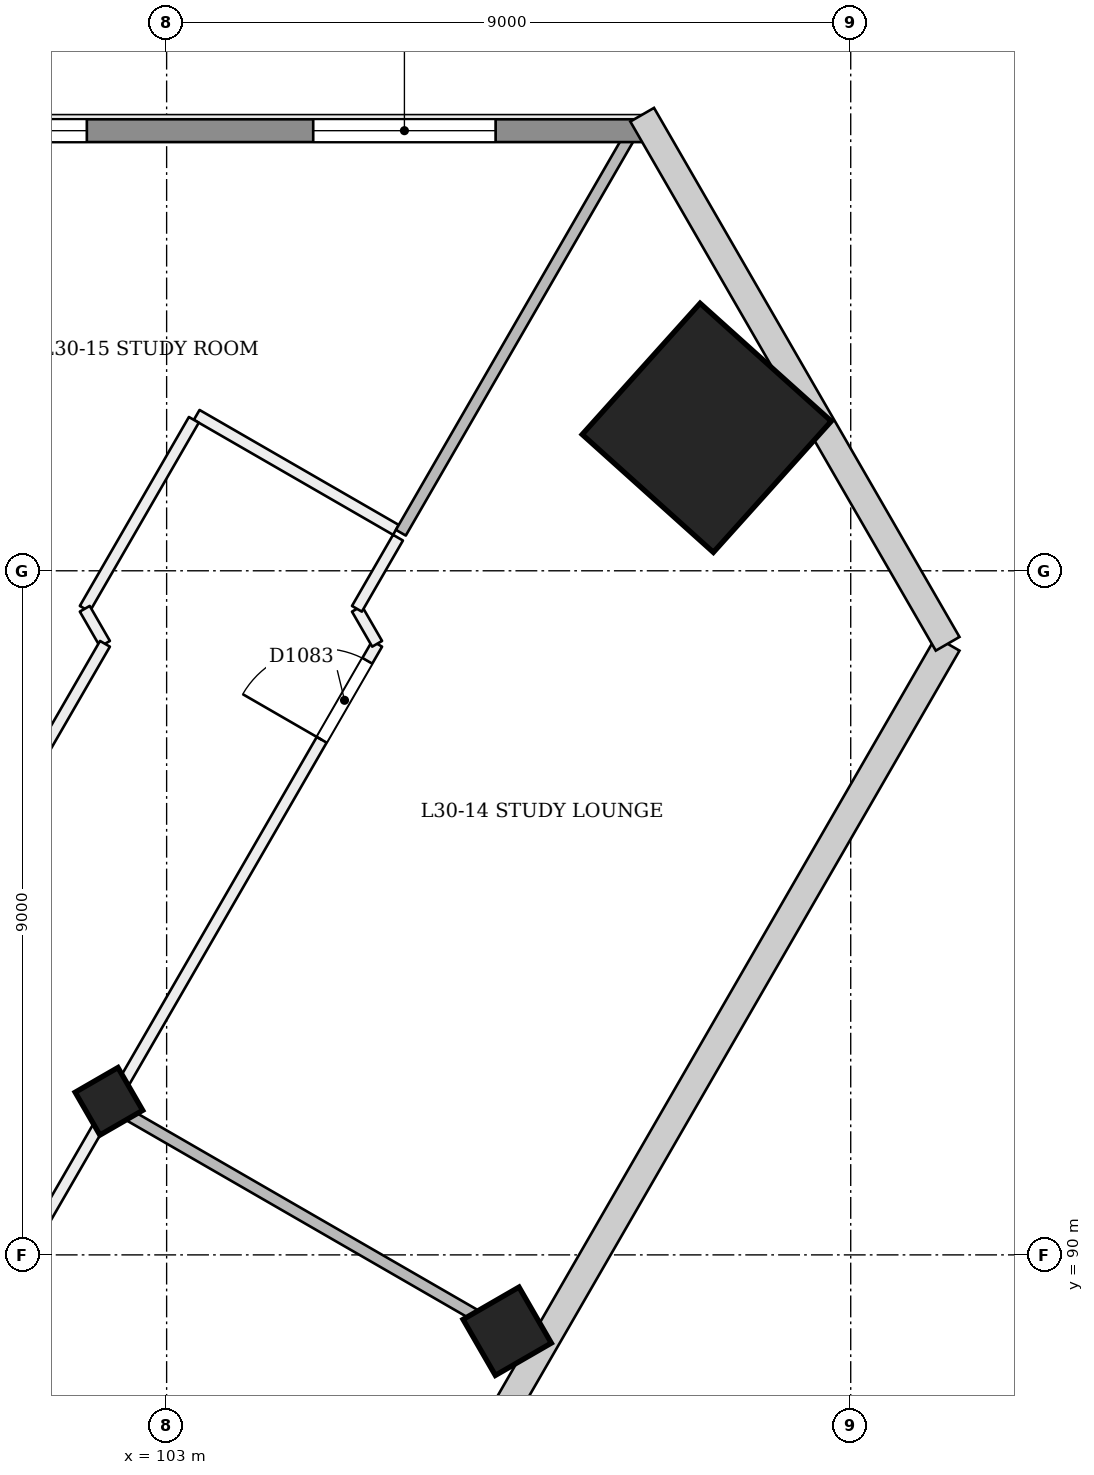
"""IFC4 building model, lengths in metres.
Left out: names, types, materials, properties, quantities, classifications, styles, units other than length and angle.
Written with IfcOpenShell. Run it as: python <this file> out.ifc"""

import sys

from ifc_helpers import new_model, si_unit, direction, frame, frame_2d, origin, origin_2d, place, context, subcontext, project, spatial, rectangle, extrude, element, fill, save


model = new_model("IFC4")
c1 = context("Model", 3, precision=1e-05, world=origin(), true_north=direction((0.0, 1.0)))
c2 = subcontext(c1, "Body", "Model", "MODEL_VIEW")
j1 = project(units=[si_unit("LENGTHUNIT", "METRE"), si_unit("PLANEANGLEUNIT", "RADIAN")], contexts=[c1])
p1 = place(None, origin())
s1 = spatial("IfcSite", under=j1, at=p1, CompositionType="ELEMENT")
p2 = place(p1, origin())
s2 = spatial("IfcBuilding", under=s1, at=p2, CompositionType="ELEMENT")
p3 = place(p2, frame((0.0, 0.0, 118.8)))
s3 = spatial("IfcBuildingStorey", under=s2, at=p3, CompositionType="ELEMENT", Elevation=118.8)
p4 = place(p3, frame((102.268, 91.973, -0.021), z_axis=(-0.022171203896, 0.038472231607, 0.999013676139), x_axis=(-0.500936355962, -0.865199313735, 0.022201684348)))
e1 = element("IfcColumn", 1, at=p4, inside=s3, PredefinedType="COLUMN", context=c2, shape_type="SweptSolid", body=[
    extrude(rectangle(XDim=0.65, YDim=0.65, at=origin_2d()), origin(), (0.0, 0.0, 1.0), 5.407),
])
p5 = place(p3, frame((110.14, 100.87, 0.0), z_axis=(-0.028425675249, 0.009219137918, 0.999553394513), x_axis=(0.500953958552, -0.865188493132, 0.022226172915)))
e2 = element("IfcColumn", 2, at=p5, inside=s3, PredefinedType="COLUMN", context=c2, shape_type="SweptSolid", body=[
    extrude(rectangle(XDim=2.32, YDim=2.32, at=origin_2d()), origin(), (0.0, 0.0, 1.0), 5.402),
])
p6 = place(p3, frame((107.508, 88.948, -0.027), z_axis=(-0.022215373253, 0.038425371216, 0.999014498412), x_axis=(-0.499733584437, -0.865894820706, 0.022192432492)))
e3 = element("IfcColumn", 3, at=p6, inside=s3, PredefinedType="COLUMN", context=c2, shape_type="SweptSolid", body=[
    extrude(rectangle(XDim=0.85, YDim=0.85, at=origin_2d()), origin(), (0.0, 0.0, 1.0), 5.407),
])
p7 = place(p3, frame((85.266, 62.526, 0.0), z_axis=(0.0, 0.0, 1.0), x_axis=(0.500002121612, 0.866024178868, 0.0)))
e4 = element("IfcWall", 4, at=p7, inside=s3, PredefinedType="PARTITIONING", context=c2, shape_type="SweptSolid", body=[
    extrude(rectangle(XDim=41.007, YDim=0.15, at=frame_2d((20.503, 0.0))), origin(), (0.0, 0.0, 1.0), 4.55),
])
p8 = place(p7, frame((0.227, 0.0, 0.0)))
e5 = element("IfcOpeningElement", 5, at=p8, cuts=e4, PredefinedType="OPENING", context=c2, shape_type="SweptSolid", body=[
    extrude(rectangle(XDim=1.2, YDim=2.1, at=frame_2d((0.6, 1.05))), frame((0.0, 0.085, 0.0), z_axis=(0.0, -1.0, 0.0), x_axis=(1.0, 0.0, 0.0)), (0.0, 0.0, 1.0), 0.171),
])
p9 = place(p7, frame((5.304, 0.0, 0.0)))
e6 = element("IfcOpeningElement", 6, at=p9, cuts=e4, PredefinedType="OPENING", context=c2, shape_type="SweptSolid", body=[
    extrude(rectangle(XDim=1.2, YDim=2.1, at=frame_2d((0.6, 1.05))), frame((0.0, 0.085, 0.0), z_axis=(0.0, -1.0, 0.0), x_axis=(1.0, 0.0, 0.0)), (0.0, 0.0, 1.0), 0.171),
])
p10 = place(p7, frame((14.304, 0.0, 0.0)))
e7 = element("IfcOpeningElement", 7, at=p10, cuts=e4, PredefinedType="OPENING", context=c2, shape_type="SweptSolid", body=[
    extrude(rectangle(XDim=1.2, YDim=2.1, at=frame_2d((0.6, 1.05))), frame((0.0, 0.085, 0.0), z_axis=(0.0, -1.0, 0.0), x_axis=(1.0, 0.0, 0.0)), (0.0, 0.0, 1.0), 0.171),
])
p11 = place(p7, frame((26.654, 0.0, 0.0)))
e8 = element("IfcOpeningElement", 8, at=p11, cuts=e4, PredefinedType="OPENING", context=c2, shape_type="SweptSolid", body=[
    extrude(rectangle(XDim=1.2, YDim=2.1, at=frame_2d((0.6, 1.05))), frame((0.0, 0.085, 0.0), z_axis=(0.0, -1.0, 0.0), x_axis=(1.0, 0.0, 0.0)), (0.0, 0.0, 1.0), 0.171),
])
p12 = place(p7, frame((39.549, 0.0, 0.0)))
e9 = element("IfcOpeningElement", 9, at=p12, cuts=e4, PredefinedType="OPENING", context=c2, shape_type="SweptSolid", body=[
    extrude(rectangle(XDim=1.2, YDim=2.1, at=frame_2d((0.6, 1.05))), frame((0.0, 0.085, 0.0), z_axis=(0.0, -1.0, 0.0), x_axis=(1.0, 0.0, 0.0)), (0.0, 0.0, 1.0), 0.171),
])
p13 = place(p3, frame((105.77, 98.04, 0.0), z_axis=(0.0, 0.0, 1.0), x_axis=(-0.500040427072, 0.866002061945, 0.0)))
e10 = element("IfcWall", 10, at=p13, inside=s3, PredefinedType="PARTITIONING", context=c2, shape_type="SweptSolid", body=[
    extrude(rectangle(XDim=0.532, YDim=0.15, at=frame_2d((0.266, 0.0))), origin(), (0.0, 0.0, 1.0), 4.95),
])
p14 = place(p3, frame((105.504, 98.5, 0.0), z_axis=(0.0, 0.0, 1.0), x_axis=(0.500002782129, 0.866023797515, 0.0)))
e11 = element("IfcWall", 11, at=p14, inside=s3, PredefinedType="PARTITIONING", context=c2, shape_type="SweptSolid", body=[
    extrude(rectangle(XDim=1.081, YDim=0.15, at=frame_2d((0.54, 0.0))), origin(), (0.0, 0.0, 1.0), 4.95),
])
p15 = place(p3, frame((106.016, 99.538, 0.0), z_axis=(0.0, 0.0, 1.0), x_axis=(-0.866125135103, 0.49982722049, 0.0)))
e12 = element("IfcWall", 12, at=p15, inside=s3, PredefinedType="PARTITIONING", context=c2, shape_type="SweptSolid", body=[
    extrude(rectangle(XDim=3.026, YDim=0.15, at=frame_2d((1.513, 0.0))), origin(), (0.0, 0.0, 1.0), 4.95),
])
p16 = place(p3, frame((103.358, 100.986, 0.0), z_axis=(0.0, 0.0, 1.0), x_axis=(-0.500036638401, -0.866004249561, 0.0)))
e13 = element("IfcWall", 13, at=p16, inside=s3, PredefinedType="PARTITIONING", context=c2, shape_type="SweptSolid", body=[
    extrude(rectangle(XDim=2.87, YDim=0.15, at=frame_2d((1.435, 0.0))), origin(), (0.0, 0.0, 1.0), 4.95),
])
p17 = place(p3, frame((101.923, 98.5, 0.0), z_axis=(0.0, 0.0, 1.0), x_axis=(0.499298623879, -0.866429964967, 0.0)))
e14 = element("IfcWall", 14, at=p17, inside=s3, PredefinedType="PARTITIONING", context=c2, shape_type="SweptSolid", body=[
    extrude(rectangle(XDim=0.532, YDim=0.15, at=frame_2d((0.266, 0.0))), origin(), (0.0, 0.0, 1.0), 4.95),
])
p18 = place(p3, frame((102.189, 98.04, 0.0), z_axis=(0.0, 0.0, 1.0), x_axis=(-0.499999806828, -0.866025515312, 0.0)))
e15 = element("IfcWall", 15, at=p18, inside=s3, PredefinedType="PARTITIONING", context=c2, shape_type="SweptSolid", body=[
    extrude(rectangle(XDim=4.496, YDim=0.15, at=frame_2d((2.248, 0.0))), origin(), (0.0, 0.0, 1.0), 4.95),
])
p19 = place(p3, frame((107.81, 88.774, 0.0), z_axis=(0.0, 0.0, 1.0), x_axis=(-0.866025537322, 0.499999768706, 0.0)))
e16 = element("IfcWall", 16, at=p19, inside=s3, PredefinedType="PARTITIONING", context=c2, shape_type="SweptSolid", body=[
    extrude(rectangle(XDim=6.325, YDim=0.15, at=frame_2d((3.163, 0.0))), origin(), (0.0, 0.0, 1.0), 4.45),
])
p20 = place(p3, frame((109.198, 104.9, 0.0), z_axis=(0.0, 0.0, 1.0), x_axis=(-0.500013984911, -0.866017329442, 0.0)))
e17 = element("IfcWall", 17, at=p20, inside=s3, PredefinedType="PARTITIONING", context=c2, shape_type="SweptSolid", body=[
    extrude(rectangle(XDim=6.234, YDim=0.15, at=frame_2d((3.117, 0.0))), origin(), (0.0, 0.0, 1.0), 4.45),
])
p21 = place(p3, frame((60.744, 104.79, 0.0), z_axis=(0.0, 0.0, 1.0), x_axis=(1.0, 0.0, 0.0)))
e18 = element("IfcWall", 18, at=p21, inside=s3, PredefinedType="SOLIDWALL", context=c2, shape_type="SweptSolid", body=[
    extrude(rectangle(XDim=48.513, YDim=0.3, at=frame_2d((24.256, 0.0))), origin(), (0.0, 0.0, 1.0), 4.45),
])
p22 = place(p21, frame((44.185, 0.0, 0.9)))
e19 = element("IfcOpeningElement", 19, at=p22, cuts=e18, PredefinedType="OPENING", context=c2, shape_type="SweptSolid", body=[
    extrude(rectangle(XDim=2.4, YDim=1.5, at=frame_2d((1.2, 0.75))), frame((0.0, 0.161, 0.0), z_axis=(0.0, -1.0, 0.0), x_axis=(1.0, 0.0, 0.0)), (0.0, 0.0, 1.0), 0.321),
])
p23 = place(p21, frame((38.807, 0.0, 0.9)))
e20 = element("IfcOpeningElement", 20, at=p23, cuts=e18, PredefinedType="OPENING", context=c2, shape_type="SweptSolid", body=[
    extrude(rectangle(XDim=2.4, YDim=1.5, at=frame_2d((1.2, 0.75))), frame((0.0, 0.161, 0.0), z_axis=(0.0, -1.0, 0.0), x_axis=(1.0, 0.0, 0.0)), (0.0, 0.0, 1.0), 0.321),
])
p24 = place(p21, frame((7.307, 0.0, 0.9)))
e21 = element("IfcOpeningElement", 21, at=p24, cuts=e18, PredefinedType="OPENING", context=c2, shape_type="SweptSolid", body=[
    extrude(rectangle(XDim=2.4, YDim=1.5, at=frame_2d((1.2, 0.75))), frame((0.0, 0.161, 0.0), z_axis=(0.0, -1.0, 0.0), x_axis=(1.0, 0.0, 0.0)), (0.0, 0.0, 1.0), 0.321),
])
p25 = place(p21, frame((1.929, 0.0, 0.9)))
e22 = element("IfcOpeningElement", 22, at=p25, cuts=e18, PredefinedType="OPENING", context=c2, shape_type="SweptSolid", body=[
    extrude(rectangle(XDim=2.4, YDim=1.5, at=frame_2d((1.2, 0.75))), frame((0.0, 0.161, 0.0), z_axis=(0.0, -1.0, 0.0), x_axis=(1.0, 0.0, 0.0)), (0.0, 0.0, 1.0), 0.321),
])
p26 = place(p12, origin())
e23 = element("IfcDoor", 23, at=p26, inside=s3, OperationType="SINGLE_SWING_LEFT", PredefinedType="NOTDEFINED", context=c2, shape_type="SweptSolid", body=[
    extrude(rectangle(XDim=1.2, YDim=2.1, at=frame_2d((0.6, 1.05))), frame((0.0, 0.025, 0.0), z_axis=(0.0, -1.0, 0.0), x_axis=(1.0, 0.0, 0.0)), (0.0, 0.0, 1.0), 0.05),
])
fill(e9, e23)
p27 = place(p22, origin())
e24 = element("IfcWindow", 24, at=p27, inside=s3, PartitioningType="SINGLE_PANEL", PredefinedType="WINDOW", context=c2, shape_type="SweptSolid", body=[
    extrude(rectangle(XDim=2.4, YDim=1.5, at=frame_2d((1.2, 0.75))), frame((0.0, 0.03, 0.0), z_axis=(0.0, -1.0, 0.0), x_axis=(1.0, 0.0, 0.0)), (0.0, 0.0, 1.0), 0.06),
])
fill(e19, e24)
p28 = place(p23, origin())
e25 = element("IfcWindow", 25, at=p28, inside=s3, PartitioningType="SINGLE_PANEL", PredefinedType="WINDOW", context=c2, shape_type="SweptSolid", body=[
    extrude(rectangle(XDim=2.4, YDim=1.5, at=frame_2d((1.2, 0.75))), frame((0.0, 0.03, 0.0), z_axis=(0.0, -1.0, 0.0), x_axis=(1.0, 0.0, 0.0)), (0.0, 0.0, 1.0), 0.06),
])
fill(e20, e25)
save(model, sys.argv[1])
